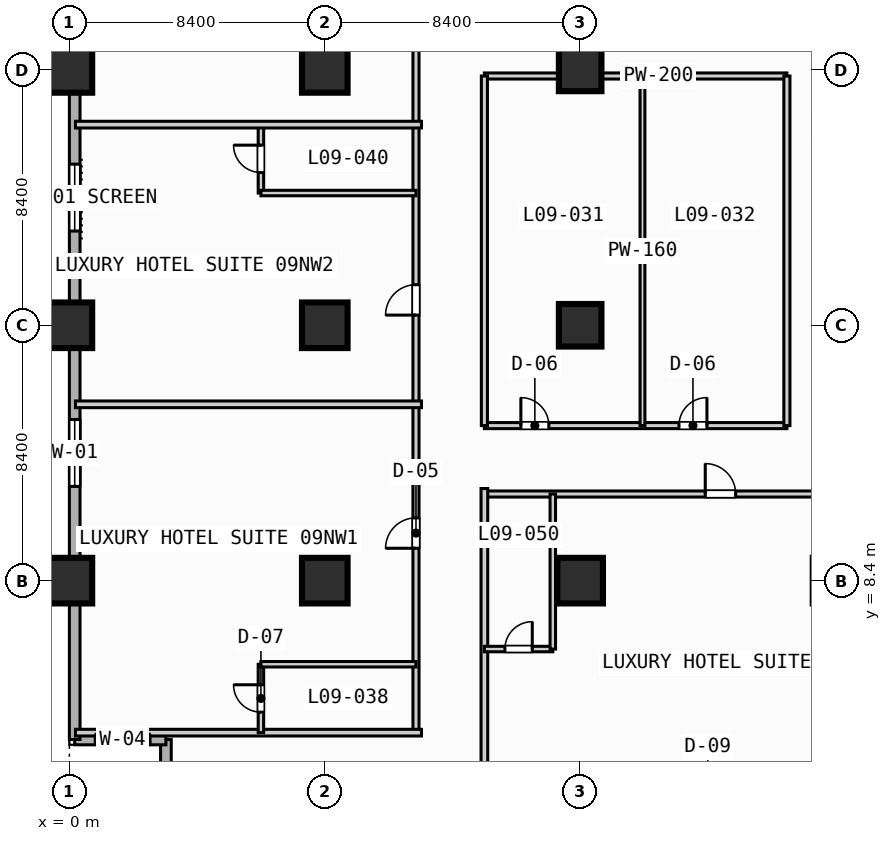
"""IFC4 building model, lengths in metres.
Left out: names, types, materials, properties, quantities, classifications, styles, units other than length and angle.
Written with IfcOpenShell. Run it as: python <this file> out.ifc"""

import sys

from ifc_helpers import new_model, si_unit, direction, frame, frame_2d, origin, origin_2d, place, context, subcontext, project, spatial, rectangle, extrude, element, fill, save


model = new_model("IFC4")
c1 = context("Model", 3, precision=1e-05, world=origin(), true_north=direction((0.0, 1.0)))
c2 = subcontext(c1, "Body", "Model", "MODEL_VIEW")
j1 = project(units=[si_unit("LENGTHUNIT", "METRE"), si_unit("PLANEANGLEUNIT", "RADIAN")], contexts=[c1])
p1 = place(None, origin())
s1 = spatial("IfcSite", under=j1, at=p1, CompositionType="ELEMENT")
p2 = place(p1, origin())
s2 = spatial("IfcBuilding", under=s1, at=p2, CompositionType="ELEMENT")
p3 = place(p2, frame((0.0, 0.0, 43.4)))
s3 = spatial("IfcBuildingStorey", under=s2, at=p3, CompositionType="ELEMENT", Elevation=43.4)
for number, where, z_axis, x_axis in (
    (1, (0.0, 8.4, 0.0), (0.0, 0.0, 1.0), (1.0, 0.0, 0.0)),
    (2, (0.0, 16.8, 0.0), (0.0, 0.0, 1.0), (1.0, 0.0, 0.0)),
    (3, (0.0, 25.2, 0.0), (0.0, 0.0, 1.0), (1.0, 0.0, 0.0)),
    (4, (8.4, 8.4, 0.0), (0.0, 0.0, 1.0), (1.0, 0.0, 0.0)),
    (5, (8.4, 16.8, 0.0), (0.0, 0.0, 1.0), (1.0, 0.0, 0.0)),
    (6, (8.4, 25.2, 0.0), (0.0, 0.0, 1.0), (1.0, 0.0, 0.0)),
    (7, (16.8, 8.4, 0.0), (0.0, 0.0, 1.0), (1.0, 0.0, 0.0)),
):
    element("IfcColumn", number, at=place(p3, frame(where, z_axis=z_axis, x_axis=x_axis)), inside=s3, PredefinedType="COLUMN", context=c2, shape_type="SweptSolid", body=[
        extrude(rectangle(XDim=1.5, YDim=1.5, at=origin_2d()), origin(), (0.0, 0.0, 1.0), 3.8),
    ])
for number, where, z_axis, x_axis in (
    (8, (16.8, 16.8, 0.0), (0.0, 0.0, 1.0), (1.0, 0.0, 0.0)),
    (9, (16.8, 25.2, 0.0), (0.0, 0.0, 1.0), (1.0, 0.0, 0.0)),
):
    element("IfcColumn", number, at=place(p3, frame(where, z_axis=z_axis, x_axis=x_axis)), inside=s3, PredefinedType="COLUMN", context=c2, shape_type="SweptSolid", body=[
        extrude(rectangle(XDim=1.4, YDim=1.4, at=origin_2d()), origin(), (0.0, 0.0, 1.0), 3.8),
    ])
p4 = place(p3, frame((3.175, 0.175, 0.0), z_axis=(0.0, 0.0, 1.0), x_axis=(0.0, 1.0, 0.0)))
e10 = element("IfcWall", 10, at=p4, inside=s3, PredefinedType="STANDARD", context=c2, shape_type="SweptSolid", body=[
    extrude(rectangle(XDim=3.0, YDim=0.35, at=frame_2d((1.5, 0.0))), origin(), (0.0, 0.0, 1.0), 3.55),
])
p5 = place(p3, frame((3.175, 3.175, 0.0), z_axis=(0.0, 0.0, 1.0), x_axis=(-1.0, 0.0, 0.0)))
e11 = element("IfcWall", 11, at=p5, inside=s3, PredefinedType="STANDARD", context=c2, shape_type="SweptSolid", body=[
    extrude(rectangle(XDim=3.0, YDim=0.35, at=frame_2d((1.5, 0.0))), origin(), (0.0, 0.0, 1.0), 3.55),
])
p6 = place(p5, frame((0.522, 0.0, 0.85)))
e12 = element("IfcOpeningElement", 12, at=p6, cuts=e11, PredefinedType="OPENING", context=c2, shape_type="SweptSolid", body=[
    extrude(rectangle(XDim=1.8, YDim=1.8, at=frame_2d((0.9, 0.9))), frame((0.0, 0.185, 0.0), z_axis=(0.0, -1.0, 0.0), x_axis=(1.0, 0.0, 0.0)), (0.0, 0.0, 1.0), 0.37),
])
p7 = place(p3, frame((0.175, 3.175, 0.0), z_axis=(0.0, 0.0, 1.0), x_axis=(0.0, 1.0, 0.0)))
e13 = element("IfcWall", 13, at=p7, inside=s3, PredefinedType="STANDARD", context=c2, shape_type="SweptSolid", body=[
    extrude(rectangle(XDim=86.05, YDim=0.35, at=frame_2d((43.025, 0.0))), origin(), (0.0, 0.0, 1.0), 3.55),
])
p8 = place(p7, frame((42.325, 0.0, 0.0)))
e14 = element("IfcOpeningElement", 14, at=p8, cuts=e13, PredefinedType="OPENING", context=c2, shape_type="SweptSolid", body=[
    extrude(rectangle(XDim=1.4, YDim=2.2, at=frame_2d((0.7, 1.1))), frame((0.0, 0.185, 0.0), z_axis=(0.0, -1.0, 0.0), x_axis=(1.0, 0.0, 0.0)), (0.0, 0.0, 1.0), 0.37),
])
p9 = place(p7, frame((8.325, 0.0, 0.85)))
e15 = element("IfcOpeningElement", 15, at=p9, cuts=e13, PredefinedType="OPENING", context=c2, shape_type="SweptSolid", body=[
    extrude(rectangle(XDim=2.2, YDim=1.8, at=frame_2d((1.1, 0.9))), frame((0.0, 0.185, 0.0), z_axis=(0.0, -1.0, 0.0), x_axis=(1.0, 0.0, 0.0)), (0.0, 0.0, 1.0), 0.37),
])
p10 = place(p7, frame((16.725, 0.0, 0.85)))
e16 = element("IfcOpeningElement", 16, at=p10, cuts=e13, PredefinedType="OPENING", context=c2, shape_type="SweptSolid", body=[
    extrude(rectangle(XDim=2.2, YDim=1.8, at=frame_2d((1.1, 0.9))), frame((0.0, 0.185, 0.0), z_axis=(0.0, -1.0, 0.0), x_axis=(1.0, 0.0, 0.0)), (0.0, 0.0, 1.0), 0.37),
])
p11 = place(p7, frame((25.125, 0.0, 0.85)))
e17 = element("IfcOpeningElement", 17, at=p11, cuts=e13, PredefinedType="OPENING", context=c2, shape_type="SweptSolid", body=[
    extrude(rectangle(XDim=2.2, YDim=1.8, at=frame_2d((1.1, 0.9))), frame((0.0, 0.185, 0.0), z_axis=(0.0, -1.0, 0.0), x_axis=(1.0, 0.0, 0.0)), (0.0, 0.0, 1.0), 0.37),
])
p12 = place(p7, frame((33.525, 0.0, 0.85)))
e18 = element("IfcOpeningElement", 18, at=p12, cuts=e13, PredefinedType="OPENING", context=c2, shape_type="SweptSolid", body=[
    extrude(rectangle(XDim=2.2, YDim=1.8, at=frame_2d((1.1, 0.9))), frame((0.0, 0.185, 0.0), z_axis=(0.0, -1.0, 0.0), x_axis=(1.0, 0.0, 0.0)), (0.0, 0.0, 1.0), 0.37),
])
p13 = place(p7, frame((56.675, 0.0, 0.85)))
e19 = element("IfcOpeningElement", 19, at=p13, cuts=e13, PredefinedType="OPENING", context=c2, shape_type="SweptSolid", body=[
    extrude(rectangle(XDim=1.8, YDim=1.8, at=frame_2d((0.9, 0.9))), frame((0.0, 0.185, 0.0), z_axis=(0.0, -1.0, 0.0), x_axis=(1.0, 0.0, 0.0)), (0.0, 0.0, 1.0), 0.37),
])
p14 = place(p3, frame((13.65, 13.5, 0.0), z_axis=(0.0, 0.0, 1.0), x_axis=(1.0, 0.0, 0.0)))
e20 = element("IfcWall", 20, at=p14, inside=s3, PredefinedType="PARTITIONING", context=c2, shape_type="SweptSolid", body=[
    extrude(rectangle(XDim=9.95, YDim=0.2, at=frame_2d((4.975, 0.0))), origin(), (0.0, 0.0, 1.0), 3.55),
])
p15 = place(p14, frame((1.2, 0.0, 0.0)))
e21 = element("IfcOpeningElement", 21, at=p15, cuts=e20, PredefinedType="OPENING", context=c2, shape_type="SweptSolid", body=[
    extrude(rectangle(XDim=0.92, YDim=2.1, at=frame_2d((0.46, 1.05))), frame((0.0, 0.11, 0.0), z_axis=(0.0, -1.0, 0.0), x_axis=(1.0, 0.0, 0.0)), (0.0, 0.0, 1.0), 0.22),
])
p16 = place(p14, frame((6.4, 0.0, 0.0)))
e22 = element("IfcOpeningElement", 22, at=p16, cuts=e20, PredefinedType="OPENING", context=c2, shape_type="SweptSolid", body=[
    extrude(rectangle(XDim=0.92, YDim=2.1, at=frame_2d((0.46, 1.05))), frame((0.0, 0.11, 0.0), z_axis=(0.0, -1.0, 0.0), x_axis=(1.0, 0.0, 0.0)), (0.0, 0.0, 1.0), 0.22),
])
p17 = place(p3, frame((18.85, 13.5, 0.0), z_axis=(0.0, 0.0, 1.0), x_axis=(0.0, 1.0, 0.0)))
e23 = element("IfcWall", 23, at=p17, inside=s3, PredefinedType="PARTITIONING", context=c2, shape_type="SweptSolid", body=[
    extrude(rectangle(XDim=11.5, YDim=0.16, at=frame_2d((5.75, 0.0))), origin(), (0.0, 0.0, 1.0), 3.55),
])
p18 = place(p3, frame((13.65, 25.0, 0.0), z_axis=(0.0, 0.0, 1.0), x_axis=(1.0, 0.0, 0.0)))
e24 = element("IfcWall", 24, at=p18, inside=s3, PredefinedType="PARTITIONING", context=c2, shape_type="SweptSolid", body=[
    extrude(rectangle(XDim=9.95, YDim=0.2, at=frame_2d((4.975, 0.0))), origin(), (0.0, 0.0, 1.0), 2.8),
])
for number, where, z_axis, x_axis in (
    (25, (13.65, 13.5, 0.0), (0.0, 0.0, 1.0), (0.0, 1.0, 0.0)),
    (26, (23.6, 13.5, 0.0), (0.0, 0.0, 1.0), (0.0, 1.0, 0.0)),
):
    element("IfcWall", number, at=place(p3, frame(where, z_axis=z_axis, x_axis=x_axis)), inside=s3, PredefinedType="PARTITIONING", context=c2, shape_type="SweptSolid", body=[
        extrude(rectangle(XDim=11.5, YDim=0.2, at=frame_2d((5.75, 0.0))), origin(), (0.0, 0.0, 1.0), 3.55),
    ])
p19 = place(p3, frame((11.4, 3.4, 0.0), z_axis=(0.0, 0.0, 1.0), x_axis=(0.0, 1.0, 0.0)))
e27 = element("IfcWall", 27, at=p19, inside=s3, PredefinedType="PARTITIONING", context=c2, shape_type="SweptSolid", body=[
    extrude(rectangle(XDim=60.4, YDim=0.2, at=frame_2d((30.2, 0.0))), origin(), (0.0, 0.0, 1.0), 3.55),
])
p20 = place(p19, frame((6.065, 0.0, 0.0)))
e28 = element("IfcOpeningElement", 28, at=p20, cuts=e27, PredefinedType="OPENING", context=c2, shape_type="SweptSolid", body=[
    extrude(rectangle(XDim=1.0, YDim=2.15, at=frame_2d((0.5, 1.075))), frame((0.0, 0.11, 0.0), z_axis=(0.0, -1.0, 0.0), x_axis=(1.0, 0.0, 0.0)), (0.0, 0.0, 1.0), 0.22),
])
p21 = place(p19, frame((13.735, 0.0, 0.0)))
e29 = element("IfcOpeningElement", 29, at=p21, cuts=e27, PredefinedType="OPENING", context=c2, shape_type="SweptSolid", body=[
    extrude(rectangle(XDim=1.0, YDim=2.15, at=frame_2d((0.5, 1.075))), frame((0.0, 0.11, 0.0), z_axis=(0.0, -1.0, 0.0), x_axis=(1.0, 0.0, 0.0)), (0.0, 0.0, 1.0), 0.22),
])
p22 = place(p19, frame((22.96, 0.0, 0.0)))
e30 = element("IfcOpeningElement", 30, at=p22, cuts=e27, PredefinedType="OPENING", context=c2, shape_type="SweptSolid", body=[
    extrude(rectangle(XDim=1.0, YDim=2.15, at=frame_2d((0.5, 1.075))), frame((0.0, 0.11, 0.0), z_axis=(0.0, -1.0, 0.0), x_axis=(1.0, 0.0, 0.0)), (0.0, 0.0, 1.0), 0.22),
])
p23 = place(p19, frame((31.785, 0.0, 0.0)))
e31 = element("IfcOpeningElement", 31, at=p23, cuts=e27, PredefinedType="OPENING", context=c2, shape_type="SweptSolid", body=[
    extrude(rectangle(XDim=1.0, YDim=2.15, at=frame_2d((0.5, 1.075))), frame((0.0, 0.11, 0.0), z_axis=(0.0, -1.0, 0.0), x_axis=(1.0, 0.0, 0.0)), (0.0, 0.0, 1.0), 0.22),
])
p24 = place(p19, frame((42.56, 0.0, 0.0)))
e32 = element("IfcOpeningElement", 32, at=p24, cuts=e27, PredefinedType="OPENING", context=c2, shape_type="SweptSolid", body=[
    extrude(rectangle(XDim=1.0, YDim=2.15, at=frame_2d((0.5, 1.075))), frame((0.0, 0.11, 0.0), z_axis=(0.0, -1.0, 0.0), x_axis=(1.0, 0.0, 0.0)), (0.0, 0.0, 1.0), 0.22),
])
p25 = place(p19, frame((53.935, 0.0, 0.0)))
e33 = element("IfcOpeningElement", 33, at=p25, cuts=e27, PredefinedType="OPENING", context=c2, shape_type="SweptSolid", body=[
    extrude(rectangle(XDim=1.0, YDim=2.15, at=frame_2d((0.5, 1.075))), frame((0.0, 0.11, 0.0), z_axis=(0.0, -1.0, 0.0), x_axis=(1.0, 0.0, 0.0)), (0.0, 0.0, 1.0), 0.22),
])
p26 = place(p3, frame((0.2, 3.4, 0.0), z_axis=(0.0, 0.0, 1.0), x_axis=(1.0, 0.0, 0.0)))
e34 = element("IfcWall", 34, at=p26, inside=s3, PredefinedType="PARTITIONING", context=c2, shape_type="SweptSolid", body=[
    extrude(rectangle(XDim=11.38, YDim=0.22, at=frame_2d((5.69, 0.0))), origin(), (0.0, 0.0, 1.0), 3.55),
])
p27 = place(p3, frame((6.3, 3.4, 0.0), z_axis=(0.0, 0.0, 1.0), x_axis=(0.0, 1.0, 0.0)))
e35 = element("IfcWall", 35, at=p27, inside=s3, PredefinedType="PLUMBINGWALL", context=c2, shape_type="SweptSolid", body=[
    extrude(rectangle(XDim=2.25, YDim=0.18, at=frame_2d((1.125, 0.0))), origin(), (0.0, 0.0, 1.0), 3.55),
])
p28 = place(p27, frame((0.675, 0.0, 0.0)))
e36 = element("IfcOpeningElement", 36, at=p28, cuts=e35, PredefinedType="OPENING", context=c2, shape_type="SweptSolid", body=[
    extrude(rectangle(XDim=0.9, YDim=2.1, at=frame_2d((0.45, 1.05))), frame((0.0, 0.1, 0.0), z_axis=(0.0, -1.0, 0.0), x_axis=(1.0, 0.0, 0.0)), (0.0, 0.0, 1.0), 0.2),
])
p29 = place(p3, frame((6.3, 5.65, 0.0), z_axis=(0.0, 0.0, 1.0), x_axis=(1.0, 0.0, 0.0)))
e37 = element("IfcWall", 37, at=p29, inside=s3, PredefinedType="PLUMBINGWALL", context=c2, shape_type="SweptSolid", body=[
    extrude(rectangle(XDim=5.1, YDim=0.18, at=frame_2d((2.55, 0.0))), origin(), (0.0, 0.0, 1.0), 3.55),
])
p30 = place(p3, frame((0.2, 14.2, 0.0), z_axis=(0.0, 0.0, 1.0), x_axis=(1.0, 0.0, 0.0)))
e38 = element("IfcWall", 38, at=p30, inside=s3, PredefinedType="PARTITIONING", context=c2, shape_type="SweptSolid", body=[
    extrude(rectangle(XDim=11.38, YDim=0.22, at=frame_2d((5.69, 0.0))), origin(), (0.0, 0.0, 1.0), 3.55),
])
p31 = place(p3, frame((6.3, 21.15, 0.0), z_axis=(0.0, 0.0, 1.0), x_axis=(0.0, 1.0, 0.0)))
e39 = element("IfcWall", 39, at=p31, inside=s3, PredefinedType="PLUMBINGWALL", context=c2, shape_type="SweptSolid", body=[
    extrude(rectangle(XDim=2.25, YDim=0.18, at=frame_2d((1.125, 0.0))), origin(), (0.0, 0.0, 1.0), 3.55),
])
p32 = place(p31, frame((0.675, 0.0, 0.0)))
e40 = element("IfcOpeningElement", 40, at=p32, cuts=e39, PredefinedType="OPENING", context=c2, shape_type="SweptSolid", body=[
    extrude(rectangle(XDim=0.9, YDim=2.1, at=frame_2d((0.45, 1.05))), frame((0.0, 0.1, 0.0), z_axis=(0.0, -1.0, 0.0), x_axis=(1.0, 0.0, 0.0)), (0.0, 0.0, 1.0), 0.2),
])
p33 = place(p3, frame((6.3, 21.15, 0.0), z_axis=(0.0, 0.0, 1.0), x_axis=(1.0, 0.0, 0.0)))
e41 = element("IfcWall", 41, at=p33, inside=s3, PredefinedType="PLUMBINGWALL", context=c2, shape_type="SweptSolid", body=[
    extrude(rectangle(XDim=5.1, YDim=0.18, at=frame_2d((2.55, 0.0))), origin(), (0.0, 0.0, 1.0), 3.55),
])
p34 = place(p3, frame((0.2, 23.4, 0.0), z_axis=(0.0, 0.0, 1.0), x_axis=(1.0, 0.0, 0.0)))
e42 = element("IfcWall", 42, at=p34, inside=s3, PredefinedType="PARTITIONING", context=c2, shape_type="SweptSolid", body=[
    extrude(rectangle(XDim=11.38, YDim=0.22, at=frame_2d((5.69, 0.0))), origin(), (0.0, 0.0, 1.0), 3.55),
])
p35 = place(p3, frame((13.65, 11.25, 0.0), z_axis=(0.0, 0.0, 1.0), x_axis=(1.0, 0.0, 0.0)))
e43 = element("IfcWall", 43, at=p35, inside=s3, PredefinedType="PARTITIONING", context=c2, shape_type="SweptSolid", body=[
    extrude(rectangle(XDim=75.15, YDim=0.2, at=frame_2d((37.575, 0.0))), origin(), (0.0, 0.0, 1.0), 3.55),
])
p36 = place(p35, frame((7.265, 0.0, 0.0)))
e44 = element("IfcOpeningElement", 44, at=p36, cuts=e43, PredefinedType="OPENING", context=c2, shape_type="SweptSolid", body=[
    extrude(rectangle(XDim=1.0, YDim=2.15, at=frame_2d((0.5, 1.075))), frame((0.0, 0.11, 0.0), z_axis=(0.0, -1.0, 0.0), x_axis=(1.0, 0.0, 0.0)), (0.0, 0.0, 1.0), 0.22),
])
p37 = place(p35, frame((17.135, 0.0, 0.0)))
e45 = element("IfcOpeningElement", 45, at=p37, cuts=e43, PredefinedType="OPENING", context=c2, shape_type="SweptSolid", body=[
    extrude(rectangle(XDim=1.0, YDim=2.15, at=frame_2d((0.5, 1.075))), frame((0.0, 0.11, 0.0), z_axis=(0.0, -1.0, 0.0), x_axis=(1.0, 0.0, 0.0)), (0.0, 0.0, 1.0), 0.22),
])
p38 = place(p35, frame((31.665, 0.0, 0.0)))
e46 = element("IfcOpeningElement", 46, at=p38, cuts=e43, PredefinedType="OPENING", context=c2, shape_type="SweptSolid", body=[
    extrude(rectangle(XDim=1.0, YDim=2.15, at=frame_2d((0.5, 1.075))), frame((0.0, 0.11, 0.0), z_axis=(0.0, -1.0, 0.0), x_axis=(1.0, 0.0, 0.0)), (0.0, 0.0, 1.0), 0.22),
])
p39 = place(p35, frame((41.535, 0.0, 0.0)))
e47 = element("IfcOpeningElement", 47, at=p39, cuts=e43, PredefinedType="OPENING", context=c2, shape_type="SweptSolid", body=[
    extrude(rectangle(XDim=1.0, YDim=2.15, at=frame_2d((0.5, 1.075))), frame((0.0, 0.11, 0.0), z_axis=(0.0, -1.0, 0.0), x_axis=(1.0, 0.0, 0.0)), (0.0, 0.0, 1.0), 0.22),
])
p40 = place(p35, frame((56.065, 0.0, 0.0)))
e48 = element("IfcOpeningElement", 48, at=p40, cuts=e43, PredefinedType="OPENING", context=c2, shape_type="SweptSolid", body=[
    extrude(rectangle(XDim=1.0, YDim=2.15, at=frame_2d((0.5, 1.075))), frame((0.0, 0.11, 0.0), z_axis=(0.0, -1.0, 0.0), x_axis=(1.0, 0.0, 0.0)), (0.0, 0.0, 1.0), 0.22),
])
p41 = place(p35, frame((66.91, 0.0, 0.0)))
e49 = element("IfcOpeningElement", 49, at=p41, cuts=e43, PredefinedType="OPENING", context=c2, shape_type="SweptSolid", body=[
    extrude(rectangle(XDim=1.0, YDim=2.15, at=frame_2d((0.5, 1.075))), frame((0.0, 0.11, 0.0), z_axis=(0.0, -1.0, 0.0), x_axis=(1.0, 0.0, 0.0)), (0.0, 0.0, 1.0), 0.22),
])
p42 = place(p3, frame((13.65, 0.2, 0.0), z_axis=(0.0, 0.0, 1.0), x_axis=(0.0, 1.0, 0.0)))
e50 = element("IfcWall", 50, at=p42, inside=s3, PredefinedType="PARTITIONING", context=c2, shape_type="SweptSolid", body=[
    extrude(rectangle(XDim=11.23, YDim=0.22, at=frame_2d((5.615, 0.0))), origin(), (0.0, 0.0, 1.0), 3.55),
])
p43 = place(p3, frame((13.65, 6.15, 0.0), z_axis=(0.0, 0.0, 1.0), x_axis=(1.0, 0.0, 0.0)))
e51 = element("IfcWall", 51, at=p43, inside=s3, PredefinedType="PLUMBINGWALL", context=c2, shape_type="SweptSolid", body=[
    extrude(rectangle(XDim=2.25, YDim=0.18, at=frame_2d((1.125, 0.0))), origin(), (0.0, 0.0, 1.0), 3.55),
])
p44 = place(p43, frame((0.675, 0.0, 0.0)))
e52 = element("IfcOpeningElement", 52, at=p44, cuts=e51, PredefinedType="OPENING", context=c2, shape_type="SweptSolid", body=[
    extrude(rectangle(XDim=0.9, YDim=2.1, at=frame_2d((0.45, 1.05))), frame((0.0, 0.1, 0.0), z_axis=(0.0, -1.0, 0.0), x_axis=(1.0, 0.0, 0.0)), (0.0, 0.0, 1.0), 0.2),
])
p45 = place(p3, frame((15.9, 6.15, 0.0), z_axis=(0.0, 0.0, 1.0), x_axis=(0.0, 1.0, 0.0)))
e53 = element("IfcWall", 53, at=p45, inside=s3, PredefinedType="PLUMBINGWALL", context=c2, shape_type="SweptSolid", body=[
    extrude(rectangle(XDim=5.1, YDim=0.18, at=frame_2d((2.55, 0.0))), origin(), (0.0, 0.0, 1.0), 3.55),
])
p46 = place(p6, origin())
e54 = element("IfcWindow", 54, at=p46, inside=s3, PartitioningType="SINGLE_PANEL", PredefinedType="WINDOW", context=c2, shape_type="SweptSolid", body=[
    extrude(rectangle(XDim=1.8, YDim=1.8, at=frame_2d((0.9, 0.9))), frame((0.0, 0.03, 0.0), z_axis=(0.0, -1.0, 0.0), x_axis=(1.0, 0.0, 0.0)), (0.0, 0.0, 1.0), 0.06),
])
fill(e12, e54)
p47 = place(p9, origin())
e55 = element("IfcWindow", 55, at=p47, inside=s3, PartitioningType="SINGLE_PANEL", PredefinedType="WINDOW", context=c2, shape_type="SweptSolid", body=[
    extrude(rectangle(XDim=2.2, YDim=1.8, at=frame_2d((1.1, 0.9))), frame((0.0, 0.03, 0.0), z_axis=(0.0, -1.0, 0.0), x_axis=(1.0, 0.0, 0.0)), (0.0, 0.0, 1.0), 0.06),
])
fill(e15, e55)
p48 = place(p10, origin())
e56 = element("IfcWindow", 56, at=p48, inside=s3, PartitioningType="SINGLE_PANEL", PredefinedType="WINDOW", context=c2, shape_type="SweptSolid", body=[
    extrude(rectangle(XDim=2.2, YDim=1.8, at=frame_2d((1.1, 0.9))), frame((0.0, 0.03, 0.0), z_axis=(0.0, -1.0, 0.0), x_axis=(1.0, 0.0, 0.0)), (0.0, 0.0, 1.0), 0.06),
])
fill(e16, e56)
p49 = place(p15, origin())
e57 = element("IfcDoor", 57, at=p49, inside=s3, OperationType="SINGLE_SWING_LEFT", PredefinedType="DOOR", context=c2, shape_type="SweptSolid", body=[
    extrude(rectangle(XDim=0.92, YDim=2.1, at=frame_2d((0.46, 1.05))), frame((0.0, 0.025, 0.0), z_axis=(0.0, -1.0, 0.0), x_axis=(1.0, 0.0, 0.0)), (0.0, 0.0, 1.0), 0.05),
])
fill(e21, e57)
p50 = place(p16, origin())
e58 = element("IfcDoor", 58, at=p50, inside=s3, OperationType="SINGLE_SWING_RIGHT", PredefinedType="DOOR", context=c2, shape_type="SweptSolid", body=[
    extrude(rectangle(XDim=0.92, YDim=2.1, at=frame_2d((0.46, 1.05))), frame((0.0, 0.025, 0.0), z_axis=(0.0, -1.0, 0.0), x_axis=(1.0, 0.0, 0.0)), (0.0, 0.0, 1.0), 0.05),
])
fill(e22, e58)
p51 = place(p20, origin())
e59 = element("IfcDoor", 59, at=p51, inside=s3, OperationType="SINGLE_SWING_LEFT", PredefinedType="DOOR", context=c2, shape_type="SweptSolid", body=[
    extrude(rectangle(XDim=1.0, YDim=2.15, at=frame_2d((0.5, 1.075))), frame((0.0, 0.025, 0.0), z_axis=(0.0, -1.0, 0.0), x_axis=(1.0, 0.0, 0.0)), (0.0, 0.0, 1.0), 0.05),
])
fill(e28, e59)
p52 = place(p21, origin())
e60 = element("IfcDoor", 60, at=p52, inside=s3, OperationType="SINGLE_SWING_LEFT", PredefinedType="DOOR", context=c2, shape_type="SweptSolid", body=[
    extrude(rectangle(XDim=1.0, YDim=2.15, at=frame_2d((0.5, 1.075))), frame((0.0, 0.025, 0.0), z_axis=(0.0, -1.0, 0.0), x_axis=(1.0, 0.0, 0.0)), (0.0, 0.0, 1.0), 0.05),
])
fill(e29, e60)
p53 = place(p28, origin())
e61 = element("IfcDoor", 61, at=p53, inside=s3, OperationType="SINGLE_SWING_RIGHT", PredefinedType="DOOR", context=c2, shape_type="SweptSolid", body=[
    extrude(rectangle(XDim=0.9, YDim=2.1, at=frame_2d((0.45, 1.05))), frame((0.0, 0.025, 0.0), z_axis=(0.0, -1.0, 0.0), x_axis=(1.0, 0.0, 0.0)), (0.0, 0.0, 1.0), 0.05),
])
fill(e36, e61)
p54 = place(p32, origin())
e62 = element("IfcDoor", 62, at=p54, inside=s3, OperationType="SINGLE_SWING_RIGHT", PredefinedType="DOOR", context=c2, shape_type="SweptSolid", body=[
    extrude(rectangle(XDim=0.9, YDim=2.1, at=frame_2d((0.45, 1.05))), frame((0.0, 0.025, 0.0), z_axis=(0.0, -1.0, 0.0), x_axis=(1.0, 0.0, 0.0)), (0.0, 0.0, 1.0), 0.05),
])
fill(e40, e62)
p55 = place(p36, origin())
e63 = element("IfcDoor", 63, at=p55, inside=s3, OperationType="SINGLE_SWING_LEFT", PredefinedType="DOOR", context=c2, shape_type="SweptSolid", body=[
    extrude(rectangle(XDim=1.0, YDim=2.15, at=frame_2d((0.5, 1.075))), frame((0.0, 0.025, 0.0), z_axis=(0.0, -1.0, 0.0), x_axis=(1.0, 0.0, 0.0)), (0.0, 0.0, 1.0), 0.05),
])
fill(e44, e63)
p56 = place(p44, origin())
e64 = element("IfcDoor", 64, at=p56, inside=s3, OperationType="SINGLE_SWING_RIGHT", PredefinedType="DOOR", context=c2, shape_type="SweptSolid", body=[
    extrude(rectangle(XDim=0.9, YDim=2.1, at=frame_2d((0.45, 1.05))), frame((0.0, 0.025, 0.0), z_axis=(0.0, -1.0, 0.0), x_axis=(1.0, 0.0, 0.0)), (0.0, 0.0, 1.0), 0.05),
])
fill(e52, e64)
save(model, sys.argv[1])
